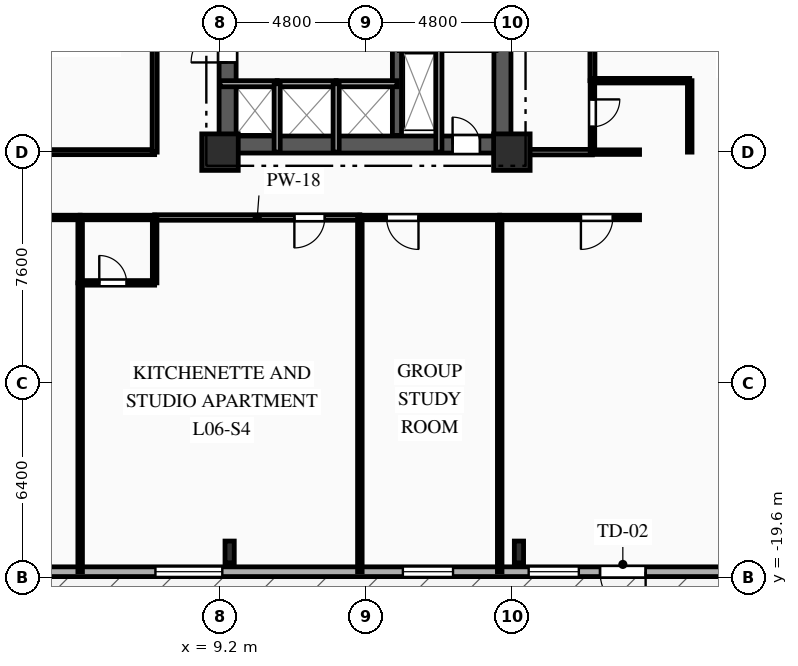
"""IFC4 building model, lengths in metres.
Left out: names, types, materials, properties, quantities, classifications, styles, units other than length and angle.
Written with IfcOpenShell. Run it as: python <this file> out.ifc"""

import sys

from ifc_helpers import new_model, si_unit, direction, frame, frame_2d, origin, origin_2d, place, context, subcontext, project, spatial, rectangle, i_section, extrude, element, fill, save


model = new_model("IFC4")
c1 = context("Model", 3, precision=1e-05, world=origin(), true_north=direction((0.0, 1.0)))
c2 = subcontext(c1, "Body", "Model", "MODEL_VIEW")
j1 = project(units=[si_unit("LENGTHUNIT", "METRE"), si_unit("PLANEANGLEUNIT", "RADIAN")], contexts=[c1])
p1 = place(None, origin())
s1 = spatial("IfcSite", under=j1, at=p1, CompositionType="ELEMENT")
p2 = place(p1, origin())
s2 = spatial("IfcBuilding", under=s1, at=p2, CompositionType="ELEMENT")
p3 = place(p2, frame((0.0, 0.0, 27.0)))
s3 = spatial("IfcBuildingStorey", under=s2, at=p3, CompositionType="ELEMENT", Elevation=27.0)
for number, where, z_axis, x_axis in (
    (1, (9.2, -5.6, 0.0), (0.0, 0.0, 1.0), (1.0, 0.0, 0.0)),
    (2, (18.8, -5.6, 0.0), (0.0, 0.0, 1.0), (1.0, 0.0, 0.0)),
):
    element("IfcColumn", number, at=place(p3, frame(where, z_axis=z_axis, x_axis=x_axis)), inside=s3, PredefinedType="COLUMN", context=c2, shape_type="SweptSolid", body=[
        extrude(rectangle(XDim=1.2, YDim=1.2, at=origin_2d()), origin(), (0.0, 0.0, 1.0), 3.35),
    ])
for number, where, z_axis, x_axis in (
    (3, (9.517, -18.75, 0.0), (0.0, 0.0, 1.0), (1.0, 0.0, 0.0)),
    (4, (19.033, -18.75, 0.0), (0.0, 0.0, 1.0), (1.0, 0.0, 0.0)),
):
    element("IfcColumn", number, at=place(p3, frame(where, z_axis=z_axis, x_axis=x_axis)), inside=s3, PredefinedType="COLUMN", context=c2, shape_type="SweptSolid", body=[
        extrude(i_section(OverallWidth=0.304, OverallDepth=0.716, WebThickness=0.021, FlangeThickness=0.04, FilletRadius=0.027, at=origin_2d()), origin(), (0.0, 0.0, 1.0), 3.35),
    ])
p4 = place(p3, frame((29.2, -19.4, 0.0), z_axis=(0.0, 0.0, 1.0), x_axis=(-1.0, 0.0, 0.0)))
e5 = element("IfcWall", 5, at=p4, inside=s3, PredefinedType="SOLIDWALL", context=c2, shape_type="SweptSolid", body=[
    extrude(rectangle(XDim=58.4, YDim=0.32, at=frame_2d((29.2, 0.0))), origin(), (0.0, 0.0, 1.0), 3.035),
])
p5 = place(p4, frame((6.0, 0.0, 0.0)))
e6 = element("IfcOpeningElement", 6, at=p5, cuts=e5, PredefinedType="OPENING", context=c2, shape_type="SweptSolid", body=[
    extrude(rectangle(XDim=1.5, YDim=2.2, at=frame_2d((0.75, 1.1))), frame((0.0, 0.17, 0.0), z_axis=(0.0, -1.0, 0.0), x_axis=(1.0, 0.0, 0.0)), (0.0, 0.0, 1.0), 0.34),
])
p6 = place(p4, frame((8.198, 0.0, 0.85)))
e7 = element("IfcOpeningElement", 7, at=p6, cuts=e5, PredefinedType="OPENING", context=c2, shape_type="SweptSolid", body=[
    extrude(rectangle(XDim=1.65, YDim=1.85, at=frame_2d((0.825, 0.925))), frame((0.0, 0.17, 0.0), z_axis=(0.0, -1.0, 0.0), x_axis=(1.0, 0.0, 0.0)), (0.0, 0.0, 1.0), 0.34),
])
p7 = place(p4, frame((12.335, 0.0, 0.85)))
e8 = element("IfcOpeningElement", 8, at=p7, cuts=e5, PredefinedType="OPENING", context=c2, shape_type="SweptSolid", body=[
    extrude(rectangle(XDim=1.65, YDim=1.85, at=frame_2d((0.825, 0.925))), frame((0.0, 0.17, 0.0), z_axis=(0.0, -1.0, 0.0), x_axis=(1.0, 0.0, 0.0)), (0.0, 0.0, 1.0), 0.34),
])
p8 = place(p4, frame((19.924, 0.0, 0.85)))
e9 = element("IfcOpeningElement", 9, at=p8, cuts=e5, PredefinedType="OPENING", context=c2, shape_type="SweptSolid", body=[
    extrude(rectangle(XDim=2.2, YDim=1.85, at=frame_2d((1.1, 0.925))), frame((0.0, 0.17, 0.0), z_axis=(0.0, -1.0, 0.0), x_axis=(1.0, 0.0, 0.0)), (0.0, 0.0, 1.0), 0.34),
])
p9 = place(p4, frame((26.565, 0.0, 0.85)))
e10 = element("IfcOpeningElement", 10, at=p9, cuts=e5, PredefinedType="OPENING", context=c2, shape_type="SweptSolid", body=[
    extrude(rectangle(XDim=2.4, YDim=1.95, at=frame_2d((1.2, 0.975))), frame((0.0, 0.17, 0.0), z_axis=(0.0, -1.0, 0.0), x_axis=(1.0, 0.0, 0.0)), (0.0, 0.0, 1.0), 0.34),
])
p10 = place(p4, frame((35.765, 0.0, 0.85)))
e11 = element("IfcOpeningElement", 11, at=p10, cuts=e5, PredefinedType="OPENING", context=c2, shape_type="SweptSolid", body=[
    extrude(rectangle(XDim=2.4, YDim=1.95, at=frame_2d((1.2, 0.975))), frame((0.0, 0.17, 0.0), z_axis=(0.0, -1.0, 0.0), x_axis=(1.0, 0.0, 0.0)), (0.0, 0.0, 1.0), 0.34),
])
p11 = place(p4, frame((44.495, 0.0, 0.85)))
e12 = element("IfcOpeningElement", 12, at=p11, cuts=e5, PredefinedType="OPENING", context=c2, shape_type="SweptSolid", body=[
    extrude(rectangle(XDim=1.65, YDim=1.85, at=frame_2d((0.825, 0.925))), frame((0.0, 0.17, 0.0), z_axis=(0.0, -1.0, 0.0), x_axis=(1.0, 0.0, 0.0)), (0.0, 0.0, 1.0), 0.34),
])
p12 = place(p4, frame((49.095, 0.0, 0.85)))
e13 = element("IfcOpeningElement", 13, at=p12, cuts=e5, PredefinedType="OPENING", context=c2, shape_type="SweptSolid", body=[
    extrude(rectangle(XDim=1.65, YDim=1.85, at=frame_2d((0.825, 0.925))), frame((0.0, 0.17, 0.0), z_axis=(0.0, -1.0, 0.0), x_axis=(1.0, 0.0, 0.0)), (0.0, 0.0, 1.0), 0.34),
])
p13 = place(p4, frame((53.92, 0.0, 0.85)))
e14 = element("IfcOpeningElement", 14, at=p13, cuts=e5, PredefinedType="OPENING", context=c2, shape_type="SweptSolid", body=[
    extrude(rectangle(XDim=2.4, YDim=1.95, at=frame_2d((1.2, 0.975))), frame((0.0, 0.17, 0.0), z_axis=(0.0, -1.0, 0.0), x_axis=(1.0, 0.0, 0.0)), (0.0, 0.0, 1.0), 0.34),
])
p14 = place(p3, frame((9.2, -5.35, 0.0), z_axis=(0.0, 0.0, 1.0), x_axis=(1.0, 0.0, 0.0)))
e15 = element("IfcWall", 15, at=p14, inside=s3, PredefinedType="SHEAR", context=c2, shape_type="SweptSolid", body=[
    extrude(rectangle(XDim=9.6, YDim=0.56, at=frame_2d((4.8, 0.0))), origin(), (0.0, 0.0, 1.0), 3.035),
])
p15 = place(p14, frame((7.65, 0.0, 0.0)))
e16 = element("IfcOpeningElement", 16, at=p15, cuts=e15, PredefinedType="OPENING", context=c2, shape_type="SweptSolid", body=[
    extrude(rectangle(XDim=0.9, YDim=2.1, at=frame_2d((0.45, 1.05))), frame((0.0, 0.29, 0.0), z_axis=(0.0, -1.0, 0.0), x_axis=(1.0, 0.0, 0.0)), (0.0, 0.0, 1.0), 0.58),
])
p16 = place(p3, frame((9.45, -5.05, 0.0), z_axis=(0.0, 0.0, 1.0), x_axis=(0.0, 1.0, 0.0)))
e17 = element("IfcWall", 17, at=p16, inside=s3, PredefinedType="SHEAR", context=c2, shape_type="SweptSolid", body=[
    extrude(rectangle(XDim=10.1, YDim=0.56, at=frame_2d((5.05, 0.0))), origin(), (0.0, 0.0, 1.0), 3.035),
])
p17 = place(p16, frame((7.15, 0.0, 0.0)))
e18 = element("IfcOpeningElement", 18, at=p17, cuts=e17, PredefinedType="OPENING", context=c2, shape_type="SweptSolid", body=[
    extrude(rectangle(XDim=0.9, YDim=2.1, at=frame_2d((0.45, 1.05))), frame((0.0, 0.29, 0.0), z_axis=(0.0, -1.0, 0.0), x_axis=(1.0, 0.0, 0.0)), (0.0, 0.0, 1.0), 0.58),
])
p18 = place(p16, frame((2.4, 0.0, 0.0)))
e19 = element("IfcOpeningElement", 19, at=p18, cuts=e17, PredefinedType="OPENING", context=c2, shape_type="SweptSolid", body=[
    extrude(rectangle(XDim=1.2, YDim=2.15, at=frame_2d((0.6, 1.075))), frame((0.0, 0.29, 0.0), z_axis=(0.0, -1.0, 0.0), x_axis=(1.0, 0.0, 0.0)), (0.0, 0.0, 1.0), 0.58),
])
p19 = place(p3, frame((18.49, -5.05, 0.0), z_axis=(0.0, 0.0, 1.0), x_axis=(0.0, 1.0, 0.0)))
e20 = element("IfcWall", 20, at=p19, inside=s3, PredefinedType="SHEAR", context=c2, shape_type="SweptSolid", body=[
    extrude(rectangle(XDim=10.1, YDim=0.56, at=frame_2d((5.05, 0.0))), origin(), (0.0, 0.0, 1.0), 3.035),
])
p20 = place(p3, frame((15.02, -5.05, 0.0), z_axis=(0.0, 0.0, 1.0), x_axis=(0.0, 1.0, 0.0)))
e21 = element("IfcWall", 21, at=p20, inside=s3, PredefinedType="SHEAR", context=c2, shape_type="SweptSolid", body=[
    extrude(rectangle(XDim=10.1, YDim=0.3, at=frame_2d((5.05, 0.0))), origin(), (0.0, 0.0, 1.0), 3.035),
])
p21 = place(p3, frame((16.4, -2.11, 0.0), z_axis=(0.0, 0.0, 1.0), x_axis=(0.0, -1.0, 0.0)))
e22 = element("IfcWall", 22, at=p21, inside=s3, PredefinedType="PARTITIONING", context=c2, shape_type="SweptSolid", body=[
    extrude(rectangle(XDim=3.49, YDim=0.2, at=frame_2d((1.745, 0.0))), origin(), (0.0, 0.0, 1.0), 3.035),
])
p22 = place(p3, frame((9.2, -3.35, 0.0), z_axis=(0.0, 0.0, 1.0), x_axis=(1.0, 0.0, 0.0)))
e23 = element("IfcWall", 23, at=p22, inside=s3, PredefinedType="PARTITIONING", context=c2, shape_type="SweptSolid", body=[
    extrude(rectangle(XDim=1.88, YDim=0.2, at=frame_2d((0.94, 0.0))), origin(), (0.0, 0.0, 1.0), 2.75),
])
p23 = place(p3, frame((11.08, -3.35, 0.0), z_axis=(0.0, 0.0, 1.0), x_axis=(1.0, 0.0, 0.0)))
e24 = element("IfcWall", 24, at=p23, inside=s3, PredefinedType="PARTITIONING", context=c2, shape_type="SweptSolid", body=[
    extrude(rectangle(XDim=1.94, YDim=0.2, at=frame_2d((0.97, 0.0))), origin(), (0.0, 0.0, 1.0), 3.035),
])
p24 = place(p3, frame((13.02, -3.35, 0.0), z_axis=(0.0, 0.0, 1.0), x_axis=(1.0, 0.0, 0.0)))
e25 = element("IfcWall", 25, at=p24, inside=s3, PredefinedType="PARTITIONING", context=c2, shape_type="SweptSolid", body=[
    extrude(rectangle(XDim=2.0, YDim=0.2, at=frame_2d((1.0, 0.0))), origin(), (0.0, 0.0, 1.0), 3.035),
])
for number, where, z_axis, x_axis in (
    (26, (11.08, -5.6, 0.0), (0.0, 0.0, 1.0), (0.0, 1.0, 0.0)),
    (27, (13.02, -5.6, 0.0), (0.0, 0.0, 1.0), (0.0, 1.0, 0.0)),
):
    element("IfcWall", number, at=place(p3, frame(where, z_axis=z_axis, x_axis=x_axis)), inside=s3, PredefinedType="PARTITIONING", context=c2, shape_type="SweptSolid", body=[
        extrude(rectangle(XDim=2.25, YDim=0.2, at=frame_2d((1.125, 0.0))), origin(), (0.0, 0.0, 1.0), 3.035),
    ])
p25 = place(p3, frame((18.8, -5.6, 0.0), z_axis=(0.0, 0.0, 1.0), x_axis=(1.0, 0.0, 0.0)))
e28 = element("IfcWall", 28, at=p25, inside=s3, PredefinedType="PARTITIONING", context=c2, shape_type="SweptSolid", body=[
    extrude(rectangle(XDim=2.65, YDim=0.18, at=frame_2d((1.325, 0.0))), origin(), (0.0, 0.0, 1.0), 3.035),
])
p26 = place(p3, frame((21.45, -5.6, 0.0), z_axis=(0.0, 0.0, 1.0), x_axis=(1.0, 0.0, 0.0)))
e29 = element("IfcWall", 29, at=p26, inside=s3, PredefinedType="PLUMBINGWALL", context=c2, shape_type="SweptSolid", body=[
    extrude(rectangle(XDim=1.55, YDim=0.15, at=frame_2d((0.775, 0.0))), origin(), (0.0, 0.0, 1.0), 3.035),
])
p27 = place(p3, frame((4.6, -7.75, 0.0), z_axis=(0.0, 0.0, 1.0), x_axis=(-1.0, 0.0, 0.0)))
e30 = element("IfcWall", 30, at=p27, inside=s3, PredefinedType="PARTITIONING", context=c2, shape_type="SweptSolid", body=[
    extrude(rectangle(XDim=4.6, YDim=0.15, at=frame_2d((2.3, 0.0))), origin(), (0.0, 0.0, 1.0), 3.035),
])
p28 = place(p3, frame((13.8, -7.75, 0.0), z_axis=(0.0, 0.0, 1.0), x_axis=(-1.0, 0.0, 0.0)))
e31 = element("IfcWall", 31, at=p28, inside=s3, PredefinedType="PARTITIONING", context=c2, shape_type="SweptSolid", body=[
    extrude(rectangle(XDim=6.75, YDim=0.18, at=frame_2d((3.375, 0.0))), origin(), (0.0, 0.0, 1.0), 3.035),
])
p29 = place(p28, frame((1.154, 0.0, 0.0)))
e32 = element("IfcOpeningElement", 32, at=p29, cuts=e31, PredefinedType="OPENING", context=c2, shape_type="SweptSolid", body=[
    extrude(rectangle(XDim=1.0, YDim=2.15, at=frame_2d((0.5, 1.075))), frame((0.0, 0.1, 0.0), z_axis=(0.0, -1.0, 0.0), x_axis=(1.0, 0.0, 0.0)), (0.0, 0.0, 1.0), 0.2),
])
p30 = place(p3, frame((7.05, -7.75, 0.0), z_axis=(0.0, 0.0, 1.0), x_axis=(-1.0, 0.0, 0.0)))
e33 = element("IfcWall", 33, at=p30, inside=s3, PredefinedType="PLUMBINGWALL", context=c2, shape_type="SweptSolid", body=[
    extrude(rectangle(XDim=2.45, YDim=0.15, at=frame_2d((1.225, 0.0))), origin(), (0.0, 0.0, 1.0), 3.035),
])
p31 = place(p3, frame((18.4, -7.75, 0.0), z_axis=(0.0, 0.0, 1.0), x_axis=(-1.0, 0.0, 0.0)))
e34 = element("IfcWall", 34, at=p31, inside=s3, PredefinedType="PARTITIONING", context=c2, shape_type="SweptSolid", body=[
    extrude(rectangle(XDim=4.6, YDim=0.15, at=frame_2d((2.3, 0.0))), origin(), (0.0, 0.0, 1.0), 3.035),
])
p32 = place(p31, frame((2.671, 0.0, 0.0)))
e35 = element("IfcOpeningElement", 35, at=p32, cuts=e34, PredefinedType="OPENING", context=c2, shape_type="SweptSolid", body=[
    extrude(rectangle(XDim=1.05, YDim=2.15, at=frame_2d((0.525, 1.075))), frame((0.0, 0.085, 0.0), z_axis=(0.0, -1.0, 0.0), x_axis=(1.0, 0.0, 0.0)), (0.0, 0.0, 1.0), 0.17),
])
p33 = place(p3, frame((23.0, -7.75, 0.0), z_axis=(0.0, 0.0, 1.0), x_axis=(-1.0, 0.0, 0.0)))
e36 = element("IfcWall", 36, at=p33, inside=s3, PredefinedType="PARTITIONING", context=c2, shape_type="SweptSolid", body=[
    extrude(rectangle(XDim=4.6, YDim=0.15, at=frame_2d((2.3, 0.0))), origin(), (0.0, 0.0, 1.0), 3.035),
])
p34 = place(p33, frame((0.879, 0.0, 0.0)))
e37 = element("IfcOpeningElement", 37, at=p34, cuts=e36, PredefinedType="OPENING", context=c2, shape_type="SweptSolid", body=[
    extrude(rectangle(XDim=1.05, YDim=2.15, at=frame_2d((0.525, 1.075))), frame((0.0, 0.085, 0.0), z_axis=(0.0, -1.0, 0.0), x_axis=(1.0, 0.0, 0.0)), (0.0, 0.0, 1.0), 0.17),
])
p35 = place(p3, frame((0.0, -5.6, 0.0), z_axis=(0.0, 0.0, 1.0), x_axis=(1.0, 0.0, 0.0)))
e38 = element("IfcWall", 38, at=p35, inside=s3, PredefinedType="PARTITIONING", context=c2, shape_type="SweptSolid", body=[
    extrude(rectangle(XDim=7.05, YDim=0.165, at=frame_2d((3.525, 0.0))), origin(), (0.0, 0.0, 1.0), 2.52),
])
p36 = place(p3, frame((7.05, -5.6, 0.0), z_axis=(0.0, 0.0, 1.0), x_axis=(0.0, 1.0, 0.0)))
e39 = element("IfcWall", 39, at=p36, inside=s3, PredefinedType="PARTITIONING", context=c2, shape_type="SweptSolid", body=[
    extrude(rectangle(XDim=7.05, YDim=0.165, at=frame_2d((3.525, 0.0))), origin(), (0.0, 0.0, 1.0), 3.035),
])
p37 = place(p3, frame((21.45, -3.25, 0.0), z_axis=(0.0, 0.0, 1.0), x_axis=(0.0, -1.0, 0.0)))
e40 = element("IfcWall", 40, at=p37, inside=s3, PredefinedType="PLUMBINGWALL", context=c2, shape_type="SweptSolid", body=[
    extrude(rectangle(XDim=2.35, YDim=0.15, at=frame_2d((1.175, 0.0))), origin(), (0.0, 0.0, 1.0), 3.035),
])
p38 = place(p37, frame((0.616, 0.0, 0.0)))
e41 = element("IfcOpeningElement", 41, at=p38, cuts=e40, PredefinedType="OPENING", context=c2, shape_type="SweptSolid", body=[
    extrude(rectangle(XDim=0.9, YDim=2.1, at=frame_2d((0.45, 1.05))), frame((0.0, 0.085, 0.0), z_axis=(0.0, -1.0, 0.0), x_axis=(1.0, 0.0, 0.0)), (0.0, 0.0, 1.0), 0.17),
])
p39 = place(p3, frame((21.45, 0.04, 0.0), z_axis=(0.0, 0.0, 1.0), x_axis=(0.0, -1.0, 0.0)))
e42 = element("IfcWall", 42, at=p39, inside=s3, PredefinedType="PARTITIONING", context=c2, shape_type="SweptSolid", body=[
    extrude(rectangle(XDim=3.29, YDim=0.165, at=frame_2d((1.645, 0.0))), origin(), (0.0, 0.0, 1.0), 3.035),
])
p40 = place(p39, frame((0.702, 0.0, 0.0)))
e43 = element("IfcOpeningElement", 43, at=p40, cuts=e42, PredefinedType="OPENING", context=c2, shape_type="SweptSolid", body=[
    extrude(rectangle(XDim=1.15, YDim=2.15, at=frame_2d((0.575, 1.075))), frame((0.0, 0.093, 0.0), z_axis=(0.0, -1.0, 0.0), x_axis=(1.0, 0.0, 0.0)), (0.0, 0.0, 1.0), 0.185),
])
p41 = place(p3, frame((21.45, -3.25, 0.0), z_axis=(0.0, 0.0, 1.0), x_axis=(1.0, 0.0, 0.0)))
e44 = element("IfcWall", 44, at=p41, inside=s3, PredefinedType="PLUMBINGWALL", context=c2, shape_type="SweptSolid", body=[
    extrude(rectangle(XDim=3.2, YDim=0.15, at=frame_2d((1.6, 0.0))), origin(), (0.0, 0.0, 1.0), 2.52),
])
p42 = place(p3, frame((24.65, -3.25, 0.0), z_axis=(0.0, 0.0, 1.0), x_axis=(0.0, -1.0, 0.0)))
e45 = element("IfcWall", 45, at=p42, inside=s3, PredefinedType="PLUMBINGWALL", context=c2, shape_type="SweptSolid", body=[
    extrude(rectangle(XDim=2.35, YDim=0.15, at=frame_2d((1.175, 0.0))), origin(), (0.0, 0.0, 1.0), 3.035),
])
p43 = place(p3, frame((4.6, -9.9, 0.0), z_axis=(0.0, 0.0, 1.0), x_axis=(0.0, -1.0, 0.0)))
e46 = element("IfcWall", 46, at=p43, inside=s3, PredefinedType="PARTITIONING", context=c2, shape_type="SweptSolid", body=[
    extrude(rectangle(XDim=9.5, YDim=0.15, at=frame_2d((4.75, 0.0))), origin(), (0.0, 0.0, 1.0), 3.035),
])
p44 = place(p3, frame((4.6, -7.75, 0.0), z_axis=(0.0, 0.0, 1.0), x_axis=(0.0, -1.0, 0.0)))
e47 = element("IfcWall", 47, at=p44, inside=s3, PredefinedType="PLUMBINGWALL", context=c2, shape_type="SweptSolid", body=[
    extrude(rectangle(XDim=2.15, YDim=0.15, at=frame_2d((1.075, 0.0))), origin(), (0.0, 0.0, 1.0), 3.035),
])
p45 = place(p3, frame((4.6, -9.9, 0.0), z_axis=(0.0, 0.0, 1.0), x_axis=(1.0, 0.0, 0.0)))
e48 = element("IfcWall", 48, at=p45, inside=s3, PredefinedType="PLUMBINGWALL", context=c2, shape_type="SweptSolid", body=[
    extrude(rectangle(XDim=2.45, YDim=0.15, at=frame_2d((1.225, 0.0))), origin(), (0.0, 0.0, 1.0), 3.035),
])
p46 = place(p45, frame((0.629, 0.0, 0.0)))
e49 = element("IfcOpeningElement", 49, at=p46, cuts=e48, PredefinedType="OPENING", context=c2, shape_type="SweptSolid", body=[
    extrude(rectangle(XDim=0.9, YDim=2.1, at=frame_2d((0.45, 1.05))), frame((0.0, 0.085, 0.0), z_axis=(0.0, -1.0, 0.0), x_axis=(1.0, 0.0, 0.0)), (0.0, 0.0, 1.0), 0.17),
])
p47 = place(p3, frame((7.05, -9.9, 0.0), z_axis=(0.0, 0.0, 1.0), x_axis=(0.0, 1.0, 0.0)))
e50 = element("IfcWall", 50, at=p47, inside=s3, PredefinedType="PLUMBINGWALL", context=c2, shape_type="SweptSolid", body=[
    extrude(rectangle(XDim=2.15, YDim=0.15, at=frame_2d((1.075, 0.0))), origin(), (0.0, 0.0, 1.0), 3.035),
])
for number, where, z_axis, x_axis in (
    (51, (13.8, -7.75, 0.0), (0.0, 0.0, 1.0), (0.0, -1.0, 0.0)),
    (52, (18.4, -7.75, 0.0), (0.0, 0.0, 1.0), (0.0, -1.0, 0.0)),
):
    element("IfcWall", number, at=place(p3, frame(where, z_axis=z_axis, x_axis=x_axis)), inside=s3, PredefinedType="PARTITIONING", context=c2, shape_type="SweptSolid", body=[
        extrude(rectangle(XDim=11.65, YDim=0.15, at=frame_2d((5.825, 0.0))), origin(), (0.0, 0.0, 1.0), 3.035),
    ])
p48 = place(p5, origin())
e53 = element("IfcDoor", 53, at=p48, inside=s3, OperationType="SINGLE_SWING_LEFT", PredefinedType="DOOR", context=c2, shape_type="SweptSolid", body=[
    extrude(rectangle(XDim=1.5, YDim=2.2, at=frame_2d((0.75, 1.1))), frame((0.0, 0.025, 0.0), z_axis=(0.0, -1.0, 0.0), x_axis=(1.0, 0.0, 0.0)), (0.0, 0.0, 1.0), 0.05),
])
fill(e6, e53)
p49 = place(p6, origin())
e54 = element("IfcWindow", 54, at=p49, inside=s3, PartitioningType="SINGLE_PANEL", PredefinedType="WINDOW", context=c2, shape_type="SweptSolid", body=[
    extrude(rectangle(XDim=1.65, YDim=1.85, at=frame_2d((0.825, 0.925))), frame((0.0, 0.03, 0.0), z_axis=(0.0, -1.0, 0.0), x_axis=(1.0, 0.0, 0.0)), (0.0, 0.0, 1.0), 0.06),
])
fill(e7, e54)
p50 = place(p7, origin())
e55 = element("IfcWindow", 55, at=p50, inside=s3, PartitioningType="SINGLE_PANEL", PredefinedType="WINDOW", context=c2, shape_type="SweptSolid", body=[
    extrude(rectangle(XDim=1.65, YDim=1.85, at=frame_2d((0.825, 0.925))), frame((0.0, 0.03, 0.0), z_axis=(0.0, -1.0, 0.0), x_axis=(1.0, 0.0, 0.0)), (0.0, 0.0, 1.0), 0.06),
])
fill(e8, e55)
p51 = place(p8, origin())
e56 = element("IfcWindow", 56, at=p51, inside=s3, PartitioningType="SINGLE_PANEL", PredefinedType="WINDOW", context=c2, shape_type="SweptSolid", body=[
    extrude(rectangle(XDim=2.2, YDim=1.85, at=frame_2d((1.1, 0.925))), frame((0.0, 0.03, 0.0), z_axis=(0.0, -1.0, 0.0), x_axis=(1.0, 0.0, 0.0)), (0.0, 0.0, 1.0), 0.06),
])
fill(e9, e56)
p52 = place(p15, origin())
e57 = element("IfcDoor", 57, at=p52, inside=s3, OperationType="SINGLE_SWING_LEFT", PredefinedType="DOOR", context=c2, shape_type="SweptSolid", body=[
    extrude(rectangle(XDim=0.9, YDim=2.1, at=frame_2d((0.45, 1.05))), frame((0.0, 0.025, 0.0), z_axis=(0.0, -1.0, 0.0), x_axis=(1.0, 0.0, 0.0)), (0.0, 0.0, 1.0), 0.05),
])
fill(e16, e57)
p53 = place(p18, origin())
e58 = element("IfcDoor", 58, at=p53, inside=s3, OperationType="SINGLE_SWING_LEFT", PredefinedType="DOOR", context=c2, shape_type="SweptSolid", body=[
    extrude(rectangle(XDim=1.2, YDim=2.15, at=frame_2d((0.6, 1.075))), frame((0.0, 0.025, 0.0), z_axis=(0.0, -1.0, 0.0), x_axis=(1.0, 0.0, 0.0)), (0.0, 0.0, 1.0), 0.05),
])
fill(e19, e58)
p54 = place(p29, origin())
e59 = element("IfcDoor", 59, at=p54, inside=s3, OperationType="SINGLE_SWING_RIGHT", PredefinedType="DOOR", context=c2, shape_type="SweptSolid", body=[
    extrude(rectangle(XDim=1.0, YDim=2.15, at=frame_2d((0.5, 1.075))), frame((0.0, 0.025, 0.0), z_axis=(0.0, -1.0, 0.0), x_axis=(1.0, 0.0, 0.0)), (0.0, 0.0, 1.0), 0.05),
])
fill(e32, e59)
p55 = place(p32, origin())
e60 = element("IfcDoor", 60, at=p55, inside=s3, OperationType="SINGLE_SWING_LEFT", PredefinedType="DOOR", context=c2, shape_type="SweptSolid", body=[
    extrude(rectangle(XDim=1.05, YDim=2.15, at=frame_2d((0.525, 1.075))), frame((0.0, 0.025, 0.0), z_axis=(0.0, -1.0, 0.0), x_axis=(1.0, 0.0, 0.0)), (0.0, 0.0, 1.0), 0.05),
])
fill(e35, e60)
p56 = place(p34, origin())
e61 = element("IfcDoor", 61, at=p56, inside=s3, OperationType="SINGLE_SWING_RIGHT", PredefinedType="DOOR", context=c2, shape_type="SweptSolid", body=[
    extrude(rectangle(XDim=1.05, YDim=2.15, at=frame_2d((0.525, 1.075))), frame((0.0, 0.025, 0.0), z_axis=(0.0, -1.0, 0.0), x_axis=(1.0, 0.0, 0.0)), (0.0, 0.0, 1.0), 0.05),
])
fill(e37, e61)
p57 = place(p38, origin())
e62 = element("IfcDoor", 62, at=p57, inside=s3, OperationType="SINGLE_SWING_LEFT", PredefinedType="DOOR", context=c2, shape_type="SweptSolid", body=[
    extrude(rectangle(XDim=0.9, YDim=2.1, at=frame_2d((0.45, 1.05))), frame((0.0, 0.025, 0.0), z_axis=(0.0, -1.0, 0.0), x_axis=(1.0, 0.0, 0.0)), (0.0, 0.0, 1.0), 0.05),
])
fill(e41, e62)
p58 = place(p46, origin())
e63 = element("IfcDoor", 63, at=p58, inside=s3, OperationType="SINGLE_SWING_LEFT", PredefinedType="DOOR", context=c2, shape_type="SweptSolid", body=[
    extrude(rectangle(XDim=0.9, YDim=2.1, at=frame_2d((0.45, 1.05))), frame((0.0, 0.025, 0.0), z_axis=(0.0, -1.0, 0.0), x_axis=(1.0, 0.0, 0.0)), (0.0, 0.0, 1.0), 0.05),
])
fill(e49, e63)
save(model, sys.argv[1])
